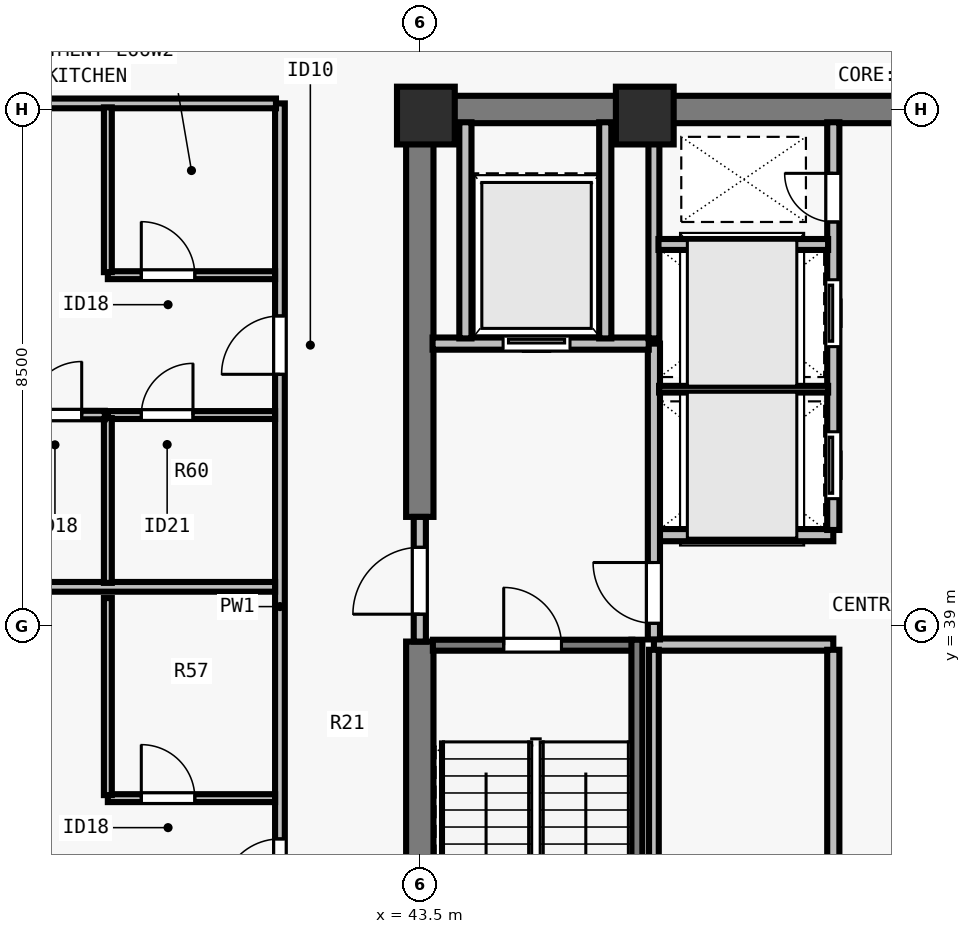
"""IFC4 building model, lengths in metres.
Left out: names, types, materials, properties, quantities, classifications, styles, units other than length and angle.
Written with IfcOpenShell. Run it as: python <this file> out.ifc"""

import sys

from ifc_helpers import new_model, si_unit, direction, frame, frame_2d, origin, origin_2d, place, context, subcontext, project, spatial, rectangle, extrude, element, fill, save


model = new_model("IFC4")
c1 = context("Model", 3, precision=1e-05, world=origin(), true_north=direction((0.0, 1.0)))
c2 = subcontext(c1, "Body", "Model", "MODEL_VIEW")
j1 = project(units=[si_unit("LENGTHUNIT", "METRE"), si_unit("PLANEANGLEUNIT", "RADIAN")], contexts=[c1])
p1 = place(None, origin())
s1 = spatial("IfcSite", under=j1, at=p1, CompositionType="ELEMENT")
p2 = place(p1, origin())
s2 = spatial("IfcBuilding", under=s1, at=p2, CompositionType="ELEMENT")
p3 = place(p2, frame((0.0, 0.0, 241.0)))
s3 = spatial("IfcBuildingStorey", under=s2, at=p3, CompositionType="ELEMENT", Elevation=241.0)
for number, where, z_axis, x_axis in (
    (1, (43.6, 47.4, 0.0), (0.0, 0.0, 1.0), (1.0, 0.0, 0.0)),
    (2, (47.2, 47.4, 0.0), (0.0, 0.0, 1.0), (1.0, 0.0, 0.0)),
):
    element("IfcColumn", number, at=place(p3, frame(where, z_axis=z_axis, x_axis=x_axis)), inside=s3, PredefinedType="COLUMN", context=c2, shape_type="SweptSolid", body=[
        extrude(rectangle(XDim=0.95, YDim=0.95, at=origin_2d()), origin(), (0.0, 0.0, 1.0), 3.5),
    ])
p4 = place(p3, frame((43.275, 47.5, 0.0), z_axis=(0.0, 0.0, 1.0), x_axis=(1.0, 0.0, 0.0)))
e3 = element("IfcWall", 3, at=p4, inside=s3, PredefinedType="SHEAR", context=c2, shape_type="SweptSolid", body=[
    extrude(rectangle(XDim=17.45, YDim=0.45, at=frame_2d((8.725, 0.0))), origin(), (0.0, 0.0, 1.0), 3.29),
])
p5 = place(p3, frame((43.5, 30.715, 0.0), z_axis=(0.0, 0.0, 1.0), x_axis=(0.0, 1.0, 0.0)))
e4 = element("IfcWall", 4, at=p5, inside=s3, PredefinedType="SHEAR", context=c2, shape_type="SweptSolid", body=[
    extrude(rectangle(XDim=8.035, YDim=0.45, at=frame_2d((4.018, 0.0))), origin(), (0.0, 0.0, 1.0), 3.29),
])
p6 = place(p3, frame((43.5, 40.8, 0.0), z_axis=(0.0, 0.0, 1.0), x_axis=(0.0, 1.0, 0.0)))
e5 = element("IfcWall", 5, at=p6, inside=s3, PredefinedType="SHEAR", context=c2, shape_type="SweptSolid", body=[
    extrude(rectangle(XDim=6.485, YDim=0.45, at=frame_2d((3.242, 0.0))), origin(), (0.0, 0.0, 1.0), 3.29),
])
for number, where, z_axis, x_axis in (
    (6, (47.35, 38.7, 0.0), (0.0, 0.0, 1.0), (1.0, 0.0, 0.0)),
    (7, (47.35, 40.5, 0.0), (0.0, 0.0, 1.0), (1.0, 0.0, 0.0)),
):
    element("IfcWall", number, at=place(p3, frame(where, z_axis=z_axis, x_axis=x_axis)), inside=s3, PredefinedType="SOLIDWALL", context=c2, shape_type="SweptSolid", body=[
        extrude(rectangle(XDim=2.95, YDim=0.2, at=frame_2d((1.475, 0.0))), origin(), (0.0, 0.0, 1.0), 3.29),
    ])
p7 = place(p3, frame((50.3, 30.71, 0.0), z_axis=(0.0, 0.0, 1.0), x_axis=(0.0, 1.0, 0.0)))
e8 = element("IfcWall", 8, at=p7, inside=s3, PredefinedType="SOLIDWALL", context=c2, shape_type="SweptSolid", body=[
    extrude(rectangle(XDim=7.905, YDim=0.2, at=frame_2d((3.953, 0.0))), origin(), (0.0, 0.0, 1.0), 3.29),
])
p8 = place(p7, frame((3.34, 0.0, 0.0)))
e9 = element("IfcOpeningElement", 9, at=p8, cuts=e8, PredefinedType="OPENING", context=c2, shape_type="SweptSolid", body=[
    extrude(rectangle(XDim=0.9, YDim=2.12, at=frame_2d((0.45, 1.06))), frame((0.0, 0.11, 0.0), z_axis=(0.0, -1.0, 0.0), x_axis=(1.0, 0.0, 0.0)), (0.0, 0.0, 1.0), 0.22),
])
p9 = place(p3, frame((50.3, 40.585, 0.0), z_axis=(0.0, 0.0, 1.0), x_axis=(0.0, 1.0, 0.0)))
e10 = element("IfcWall", 10, at=p9, inside=s3, PredefinedType="SOLIDWALL", context=c2, shape_type="SweptSolid", body=[
    extrude(rectangle(XDim=6.705, YDim=0.2, at=frame_2d((3.353, 0.0))), origin(), (0.0, 0.0, 1.0), 3.29),
])
p10 = place(p9, frame((0.515, 0.0, 0.0)))
e11 = element("IfcOpeningElement", 11, at=p10, cuts=e10, PredefinedType="OPENING", context=c2, shape_type="SweptSolid", body=[
    extrude(rectangle(XDim=1.1, YDim=2.2, at=frame_2d((0.55, 1.1))), frame((0.0, 0.11, 0.0), z_axis=(0.0, -1.0, 0.0), x_axis=(1.0, 0.0, 0.0)), (0.0, 0.0, 1.0), 0.22),
])
p11 = place(p9, frame((3.015, 0.0, 0.0)))
e12 = element("IfcOpeningElement", 12, at=p11, cuts=e10, PredefinedType="OPENING", context=c2, shape_type="SweptSolid", body=[
    extrude(rectangle(XDim=1.1, YDim=2.2, at=frame_2d((0.55, 1.1))), frame((0.0, 0.11, 0.0), z_axis=(0.0, -1.0, 0.0), x_axis=(1.0, 0.0, 0.0)), (0.0, 0.0, 1.0), 0.22),
])
p12 = place(p9, frame((5.065, 0.0, 0.0)))
e13 = element("IfcOpeningElement", 13, at=p12, cuts=e10, PredefinedType="OPENING", context=c2, shape_type="SweptSolid", body=[
    extrude(rectangle(XDim=0.8, YDim=2.08, at=frame_2d((0.4, 1.04))), frame((0.0, 0.11, 0.0), z_axis=(0.0, -1.0, 0.0), x_axis=(1.0, 0.0, 0.0)), (0.0, 0.0, 1.0), 0.22),
])
p13 = place(p3, frame((43.5, 38.75, 0.0), z_axis=(0.0, 0.0, 1.0), x_axis=(0.0, 1.0, 0.0)))
e14 = element("IfcWall", 14, at=p13, inside=s3, PredefinedType="SOLIDWALL", context=c2, shape_type="SweptSolid", body=[
    extrude(rectangle(XDim=2.05, YDim=0.2, at=frame_2d((1.025, 0.0))), origin(), (0.0, 0.0, 1.0), 3.29),
])
p14 = place(p13, frame((0.45, 0.0, 0.0)))
e15 = element("IfcOpeningElement", 15, at=p14, cuts=e14, PredefinedType="OPENING", context=c2, shape_type="SweptSolid", body=[
    extrude(rectangle(XDim=1.1, YDim=2.15, at=frame_2d((0.55, 1.075))), frame((0.0, 0.11, 0.0), z_axis=(0.0, -1.0, 0.0), x_axis=(1.0, 0.0, 0.0)), (0.0, 0.0, 1.0), 0.22),
])
p15 = place(p3, frame((47.35, 38.785, 0.0), z_axis=(0.0, 0.0, 1.0), x_axis=(0.0, 1.0, 0.0)))
e16 = element("IfcWall", 16, at=p15, inside=s3, PredefinedType="SOLIDWALL", context=c2, shape_type="SweptSolid", body=[
    extrude(rectangle(XDim=4.865, YDim=0.2, at=frame_2d((2.433, 0.0))), origin(), (0.0, 0.0, 1.0), 3.29),
])
p16 = place(p15, frame((0.265, 0.0, 0.0)))
e17 = element("IfcOpeningElement", 17, at=p16, cuts=e16, PredefinedType="OPENING", context=c2, shape_type="SweptSolid", body=[
    extrude(rectangle(XDim=1.0, YDim=2.15, at=frame_2d((0.5, 1.075))), frame((0.0, 0.11, 0.0), z_axis=(0.0, -1.0, 0.0), x_axis=(1.0, 0.0, 0.0)), (0.0, 0.0, 1.0), 0.22),
])
p17 = place(p3, frame((43.71, 43.65, 0.0), z_axis=(0.0, 0.0, 1.0), x_axis=(1.0, 0.0, 0.0)))
e18 = element("IfcWall", 18, at=p17, inside=s3, PredefinedType="SOLIDWALL", context=c2, shape_type="SweptSolid", body=[
    extrude(rectangle(XDim=3.555, YDim=0.2, at=frame_2d((1.777, 0.0))), origin(), (0.0, 0.0, 1.0), 3.29),
])
p18 = place(p17, frame((1.16, 0.0, 0.0)))
e19 = element("IfcOpeningElement", 19, at=p18, cuts=e18, PredefinedType="OPENING", context=c2, shape_type="SweptSolid", body=[
    extrude(rectangle(XDim=1.1, YDim=2.2, at=frame_2d((0.55, 1.1))), frame((0.0, 0.11, 0.0), z_axis=(0.0, -1.0, 0.0), x_axis=(1.0, 0.0, 0.0)), (0.0, 0.0, 1.0), 0.22),
])
for number, where, z_axis, x_axis in (
    (20, (46.55, 43.735, 0.0), (0.0, 0.0, 1.0), (0.0, 1.0, 0.0)),
    (21, (44.25, 43.735, 0.0), (0.0, 0.0, 1.0), (0.0, 1.0, 0.0)),
):
    element("IfcWall", number, at=place(p3, frame(where, z_axis=z_axis, x_axis=x_axis)), inside=s3, PredefinedType="SOLIDWALL", context=c2, shape_type="SweptSolid", body=[
        extrude(rectangle(XDim=3.555, YDim=0.2, at=frame_2d((1.777, 0.0))), origin(), (0.0, 0.0, 1.0), 3.29),
    ])
p19 = place(p3, frame((47.35, 30.71, 0.0), z_axis=(0.0, 0.0, 1.0), x_axis=(0.0, 1.0, 0.0)))
e22 = element("IfcWall", 22, at=p19, inside=s3, PredefinedType="PARTITIONING", context=c2, shape_type="SweptSolid", body=[
    extrude(rectangle(XDim=7.905, YDim=0.16, at=frame_2d((3.953, 0.0))), origin(), (0.0, 0.0, 1.0), 3.29),
])
p20 = place(p3, frame((47.35, 43.735, 0.0), z_axis=(0.0, 0.0, 1.0), x_axis=(0.0, 1.0, 0.0)))
e23 = element("IfcWall", 23, at=p20, inside=s3, PredefinedType="SOLIDWALL", context=c2, shape_type="SweptSolid", body=[
    extrude(rectangle(XDim=3.555, YDim=0.18, at=frame_2d((1.777, 0.0))), origin(), (0.0, 0.0, 1.0), 3.29),
])
p21 = place(p3, frame((47.435, 42.9, 0.0), z_axis=(0.0, 0.0, 1.0), x_axis=(1.0, 0.0, 0.0)))
e24 = element("IfcWall", 24, at=p21, inside=s3, PredefinedType="PARTITIONING", context=c2, shape_type="SweptSolid", body=[
    extrude(rectangle(XDim=2.78, YDim=0.11, at=frame_2d((1.39, 0.0))), origin(), (0.0, 0.0, 1.0), 3.29),
])
p22 = place(p3, frame((47.425, 45.28, 0.0), z_axis=(0.0, 0.0, 1.0), x_axis=(1.0, 0.0, 0.0)))
e25 = element("IfcWall", 25, at=p22, inside=s3, PredefinedType="SOLIDWALL", context=c2, shape_type="SweptSolid", body=[
    extrude(rectangle(XDim=2.79, YDim=0.18, at=frame_2d((1.395, 0.0))), origin(), (0.0, 0.0, 1.0), 3.29),
])
p23 = place(p3, frame((41.2, 30.4, 0.0), z_axis=(0.0, 0.0, 1.0), x_axis=(0.0, 1.0, 0.0)))
e26 = element("IfcWall", 26, at=p23, inside=s3, PredefinedType="PARTITIONING", context=c2, shape_type="SweptSolid", body=[
    extrude(rectangle(XDim=17.2, YDim=0.16, at=frame_2d((8.6, 0.0))), origin(), (0.0, 0.0, 1.0), 3.29),
])
p24 = place(p23, frame((4.145, 0.0, 0.0)))
e27 = element("IfcOpeningElement", 27, at=p24, cuts=e26, PredefinedType="OPENING", context=c2, shape_type="SweptSolid", body=[
    extrude(rectangle(XDim=0.96, YDim=2.18, at=frame_2d((0.48, 1.09))), frame((0.0, 0.09, 0.0), z_axis=(0.0, -1.0, 0.0), x_axis=(1.0, 0.0, 0.0)), (0.0, 0.0, 1.0), 0.18),
])
p25 = place(p23, frame((12.745, 0.0, 0.0)))
e28 = element("IfcOpeningElement", 28, at=p25, cuts=e26, PredefinedType="OPENING", context=c2, shape_type="SweptSolid", body=[
    extrude(rectangle(XDim=0.96, YDim=2.18, at=frame_2d((0.48, 1.09))), frame((0.0, 0.09, 0.0), z_axis=(0.0, -1.0, 0.0), x_axis=(1.0, 0.0, 0.0)), (0.0, 0.0, 1.0), 0.18),
])
p26 = place(p3, frame((29.805, 47.6, 0.0), z_axis=(0.0, 0.0, 1.0), x_axis=(1.0, 0.0, 0.0)))
e29 = element("IfcWall", 29, at=p26, inside=s3, PredefinedType="PARTITIONING", context=c2, shape_type="SweptSolid", body=[
    extrude(rectangle(XDim=11.33, YDim=0.16, at=frame_2d((5.665, 0.0))), origin(), (0.0, 0.0, 1.0), 3.29),
])
p27 = place(p3, frame((29.77, 39.65, 0.0), z_axis=(0.0, 0.0, 1.0), x_axis=(1.0, 0.0, 0.0)))
e30 = element("IfcWall", 30, at=p27, inside=s3, PredefinedType="PARTITIONING", context=c2, shape_type="SweptSolid", body=[
    extrude(rectangle(XDim=11.35, YDim=0.16, at=frame_2d((5.675, 0.0))), origin(), (0.0, 0.0, 1.0), 2.958),
])
p28 = place(p3, frame((38.37, 36.175, 0.0), z_axis=(0.0, 0.0, 1.0), x_axis=(1.0, 0.0, 0.0)))
e31 = element("IfcWall", 31, at=p28, inside=s3, PredefinedType="PLUMBINGWALL", context=c2, shape_type="SweptSolid", body=[
    extrude(rectangle(XDim=2.75, YDim=0.13, at=frame_2d((1.375, 0.0))), origin(), (0.0, 0.0, 1.0), 3.29),
])
p29 = place(p28, frame((0.55, 0.0, 0.0)))
e32 = element("IfcOpeningElement", 32, at=p29, cuts=e31, PredefinedType="OPENING", context=c2, shape_type="SweptSolid", body=[
    extrude(rectangle(XDim=0.88, YDim=2.1, at=frame_2d((0.44, 1.05))), frame((0.0, 0.075, 0.0), z_axis=(0.0, -1.0, 0.0), x_axis=(1.0, 0.0, 0.0)), (0.0, 0.0, 1.0), 0.15),
])
p30 = place(p3, frame((38.37, 36.225, 0.0), z_axis=(0.0, 0.0, 1.0), x_axis=(0.0, 1.0, 0.0)))
e33 = element("IfcWall", 33, at=p30, inside=s3, PredefinedType="PLUMBINGWALL", context=c2, shape_type="SweptSolid", body=[
    extrude(rectangle(XDim=3.24, YDim=0.13, at=frame_2d((1.62, 0.0))), origin(), (0.0, 0.0, 1.0), 3.29),
])
p31 = place(p3, frame((38.37, 42.475, 0.0), z_axis=(0.0, 0.0, 1.0), x_axis=(1.0, 0.0, 0.0)))
e34 = element("IfcWall", 34, at=p31, inside=s3, PredefinedType="PLUMBINGWALL", context=c2, shape_type="SweptSolid", body=[
    extrude(rectangle(XDim=2.75, YDim=0.13, at=frame_2d((1.375, 0.0))), origin(), (0.0, 0.0, 1.0), 2.958),
])
p32 = place(p31, frame((0.55, 0.0, 0.0)))
e35 = element("IfcOpeningElement", 35, at=p32, cuts=e34, PredefinedType="OPENING", context=c2, shape_type="SweptSolid", body=[
    extrude(rectangle(XDim=0.85, YDim=2.08, at=frame_2d((0.425, 1.04))), frame((0.0, 0.075, 0.0), z_axis=(0.0, -1.0, 0.0), x_axis=(1.0, 0.0, 0.0)), (0.0, 0.0, 1.0), 0.15),
])
p33 = place(p3, frame((38.37, 39.715, 0.0), z_axis=(0.0, 0.0, 1.0), x_axis=(0.0, 1.0, 0.0)))
e36 = element("IfcWall", 36, at=p33, inside=s3, PredefinedType="PLUMBINGWALL", context=c2, shape_type="SweptSolid", body=[
    extrude(rectangle(XDim=2.71, YDim=0.13, at=frame_2d((1.355, 0.0))), origin(), (0.0, 0.0, 1.0), 3.29),
])
p34 = place(p3, frame((38.37, 44.775, 0.0), z_axis=(0.0, 0.0, 1.0), x_axis=(1.0, 0.0, 0.0)))
e37 = element("IfcWall", 37, at=p34, inside=s3, PredefinedType="PLUMBINGWALL", context=c2, shape_type="SweptSolid", body=[
    extrude(rectangle(XDim=2.75, YDim=0.13, at=frame_2d((1.375, 0.0))), origin(), (0.0, 0.0, 1.0), 2.958),
])
p35 = place(p34, frame((0.55, 0.0, 0.0)))
e38 = element("IfcOpeningElement", 38, at=p35, cuts=e37, PredefinedType="OPENING", context=c2, shape_type="SweptSolid", body=[
    extrude(rectangle(XDim=0.88, YDim=2.1, at=frame_2d((0.44, 1.05))), frame((0.0, 0.075, 0.0), z_axis=(0.0, -1.0, 0.0), x_axis=(1.0, 0.0, 0.0)), (0.0, 0.0, 1.0), 0.15),
])
p36 = place(p3, frame((38.37, 44.825, 0.0), z_axis=(0.0, 0.0, 1.0), x_axis=(0.0, 1.0, 0.0)))
e39 = element("IfcWall", 39, at=p36, inside=s3, PredefinedType="PLUMBINGWALL", context=c2, shape_type="SweptSolid", body=[
    extrude(rectangle(XDim=2.71, YDim=0.13, at=frame_2d((1.355, 0.0))), origin(), (0.0, 0.0, 1.0), 3.29),
])
p37 = place(p3, frame((32.055, 42.475, 0.0), z_axis=(0.0, 0.0, 1.0), x_axis=(1.0, 0.0, 0.0)))
e40 = element("IfcWall", 40, at=p37, inside=s3, PredefinedType="PARTITIONING", context=c2, shape_type="SweptSolid", body=[
    extrude(rectangle(XDim=6.265, YDim=0.14, at=frame_2d((3.133, 0.0))), origin(), (0.0, 0.0, 1.0), 3.29),
])
p38 = place(p37, frame((5.005, 0.0, 0.0)))
e41 = element("IfcOpeningElement", 41, at=p38, cuts=e40, PredefinedType="OPENING", context=c2, shape_type="SweptSolid", body=[
    extrude(rectangle(XDim=0.88, YDim=2.1, at=frame_2d((0.44, 1.05))), frame((0.0, 0.08, 0.0), z_axis=(0.0, -1.0, 0.0), x_axis=(1.0, 0.0, 0.0)), (0.0, 0.0, 1.0), 0.16),
])
p39 = place(p3, frame((43.715, 38.69, 0.0), z_axis=(0.0, 0.0, 1.0), x_axis=(1.0, 0.0, 0.0)))
e42 = element("IfcWall", 42, at=p39, inside=s3, PredefinedType="SOLIDWALL", context=c2, shape_type="SweptSolid", body=[
    extrude(rectangle(XDim=3.28, YDim=0.18, at=frame_2d((1.64, 0.0))), origin(), (0.0, 0.0, 1.0), 3.29),
])
p40 = place(p39, frame((1.165, 0.0, 0.0)))
e43 = element("IfcOpeningElement", 43, at=p40, cuts=e42, PredefinedType="OPENING", context=c2, shape_type="SweptSolid", body=[
    extrude(rectangle(XDim=0.95, YDim=2.15, at=frame_2d((0.475, 1.075))), frame((0.0, 0.1, 0.0), z_axis=(0.0, -1.0, 0.0), x_axis=(1.0, 0.0, 0.0)), (0.0, 0.0, 1.0), 0.2),
])
p41 = place(p3, frame((47.07, 38.78, 0.0), z_axis=(0.0, 0.0, 1.0), x_axis=(0.0, -1.0, 0.0)))
e44 = element("IfcWall", 44, at=p41, inside=s3, PredefinedType="SOLIDWALL", context=c2, shape_type="SweptSolid", body=[
    extrude(rectangle(XDim=8.067, YDim=0.18, at=frame_2d((4.034, 0.0))), origin(), (0.0, 0.0, 1.0), 3.29),
])
p42 = place(p14, origin())
e45 = element("IfcDoor", 45, at=p42, inside=s3, OperationType="SINGLE_SWING_LEFT", PredefinedType="DOOR", context=c2, shape_type="SweptSolid", body=[
    extrude(rectangle(XDim=1.1, YDim=2.15, at=frame_2d((0.55, 1.075))), frame((0.0, 0.025, 0.0), z_axis=(0.0, -1.0, 0.0), x_axis=(1.0, 0.0, 0.0)), (0.0, 0.0, 1.0), 0.05),
])
fill(e15, e45)
p43 = place(p16, origin())
e46 = element("IfcDoor", 46, at=p43, inside=s3, OperationType="SINGLE_SWING_RIGHT", PredefinedType="DOOR", context=c2, shape_type="SweptSolid", body=[
    extrude(rectangle(XDim=1.0, YDim=2.15, at=frame_2d((0.5, 1.075))), frame((0.0, 0.025, 0.0), z_axis=(0.0, -1.0, 0.0), x_axis=(1.0, 0.0, 0.0)), (0.0, 0.0, 1.0), 0.05),
])
fill(e17, e46)
p44 = place(p18, origin())
e47 = element("IfcDoor", 47, at=p44, inside=s3, OperationType="SLIDING_TO_LEFT", PredefinedType="DOOR", context=c2, shape_type="SweptSolid", body=[
    extrude(rectangle(XDim=1.1, YDim=2.2, at=frame_2d((0.55, 1.1))), frame((0.0, 0.025, 0.0), z_axis=(0.0, -1.0, 0.0), x_axis=(1.0, 0.0, 0.0)), (0.0, 0.0, 1.0), 0.05),
])
fill(e19, e47)
p45 = place(p10, origin())
e48 = element("IfcDoor", 48, at=p45, inside=s3, OperationType="SLIDING_TO_LEFT", PredefinedType="DOOR", context=c2, shape_type="SweptSolid", body=[
    extrude(rectangle(XDim=1.1, YDim=2.2, at=frame_2d((0.55, 1.1))), frame((0.0, 0.025, 0.0), z_axis=(0.0, -1.0, 0.0), x_axis=(1.0, 0.0, 0.0)), (0.0, 0.0, 1.0), 0.05),
])
fill(e11, e48)
p46 = place(p11, origin())
e49 = element("IfcDoor", 49, at=p46, inside=s3, OperationType="SLIDING_TO_LEFT", PredefinedType="DOOR", context=c2, shape_type="SweptSolid", body=[
    extrude(rectangle(XDim=1.1, YDim=2.2, at=frame_2d((0.55, 1.1))), frame((0.0, 0.025, 0.0), z_axis=(0.0, -1.0, 0.0), x_axis=(1.0, 0.0, 0.0)), (0.0, 0.0, 1.0), 0.05),
])
fill(e12, e49)
p47 = place(p12, origin())
e50 = element("IfcDoor", 50, at=p47, inside=s3, OperationType="SINGLE_SWING_RIGHT", PredefinedType="DOOR", context=c2, shape_type="SweptSolid", body=[
    extrude(rectangle(XDim=0.8, YDim=2.08, at=frame_2d((0.4, 1.04))), frame((0.0, 0.025, 0.0), z_axis=(0.0, -1.0, 0.0), x_axis=(1.0, 0.0, 0.0)), (0.0, 0.0, 1.0), 0.05),
])
fill(e13, e50)
p48 = place(p29, origin())
e51 = element("IfcDoor", 51, at=p48, inside=s3, OperationType="SINGLE_SWING_LEFT", PredefinedType="DOOR", context=c2, shape_type="SweptSolid", body=[
    extrude(rectangle(XDim=0.88, YDim=2.1, at=frame_2d((0.44, 1.05))), frame((0.0, 0.025, 0.0), z_axis=(0.0, -1.0, 0.0), x_axis=(1.0, 0.0, 0.0)), (0.0, 0.0, 1.0), 0.05),
])
fill(e32, e51)
p49 = place(p24, origin())
e52 = element("IfcDoor", 52, at=p49, inside=s3, OperationType="SINGLE_SWING_LEFT", PredefinedType="DOOR", context=c2, shape_type="SweptSolid", body=[
    extrude(rectangle(XDim=0.96, YDim=2.18, at=frame_2d((0.48, 1.09))), frame((0.0, 0.025, 0.0), z_axis=(0.0, -1.0, 0.0), x_axis=(1.0, 0.0, 0.0)), (0.0, 0.0, 1.0), 0.05),
])
fill(e27, e52)
p50 = place(p32, origin())
e53 = element("IfcDoor", 53, at=p50, inside=s3, OperationType="SINGLE_SWING_RIGHT", PredefinedType="DOOR", context=c2, shape_type="SweptSolid", body=[
    extrude(rectangle(XDim=0.85, YDim=2.08, at=frame_2d((0.425, 1.04))), frame((0.0, 0.025, 0.0), z_axis=(0.0, -1.0, 0.0), x_axis=(1.0, 0.0, 0.0)), (0.0, 0.0, 1.0), 0.05),
])
fill(e35, e53)
p51 = place(p35, origin())
e54 = element("IfcDoor", 54, at=p51, inside=s3, OperationType="SINGLE_SWING_LEFT", PredefinedType="DOOR", context=c2, shape_type="SweptSolid", body=[
    extrude(rectangle(XDim=0.88, YDim=2.1, at=frame_2d((0.44, 1.05))), frame((0.0, 0.025, 0.0), z_axis=(0.0, -1.0, 0.0), x_axis=(1.0, 0.0, 0.0)), (0.0, 0.0, 1.0), 0.05),
])
fill(e38, e54)
p52 = place(p38, origin())
e55 = element("IfcDoor", 55, at=p52, inside=s3, OperationType="SINGLE_SWING_RIGHT", PredefinedType="DOOR", context=c2, shape_type="SweptSolid", body=[
    extrude(rectangle(XDim=0.88, YDim=2.1, at=frame_2d((0.44, 1.05))), frame((0.0, 0.025, 0.0), z_axis=(0.0, -1.0, 0.0), x_axis=(1.0, 0.0, 0.0)), (0.0, 0.0, 1.0), 0.05),
])
fill(e41, e55)
p53 = place(p25, origin())
e56 = element("IfcDoor", 56, at=p53, inside=s3, OperationType="SINGLE_SWING_LEFT", PredefinedType="DOOR", context=c2, shape_type="SweptSolid", body=[
    extrude(rectangle(XDim=0.96, YDim=2.18, at=frame_2d((0.48, 1.09))), frame((0.0, 0.025, 0.0), z_axis=(0.0, -1.0, 0.0), x_axis=(1.0, 0.0, 0.0)), (0.0, 0.0, 1.0), 0.05),
])
fill(e28, e56)
p54 = place(p40, origin())
e57 = element("IfcDoor", 57, at=p54, inside=s3, OperationType="SINGLE_SWING_LEFT", PredefinedType="DOOR", context=c2, shape_type="SweptSolid", body=[
    extrude(rectangle(XDim=0.95, YDim=2.15, at=frame_2d((0.475, 1.075))), frame((0.0, 0.025, 0.0), z_axis=(0.0, -1.0, 0.0), x_axis=(1.0, 0.0, 0.0)), (0.0, 0.0, 1.0), 0.05),
])
fill(e43, e57)
save(model, sys.argv[1])
